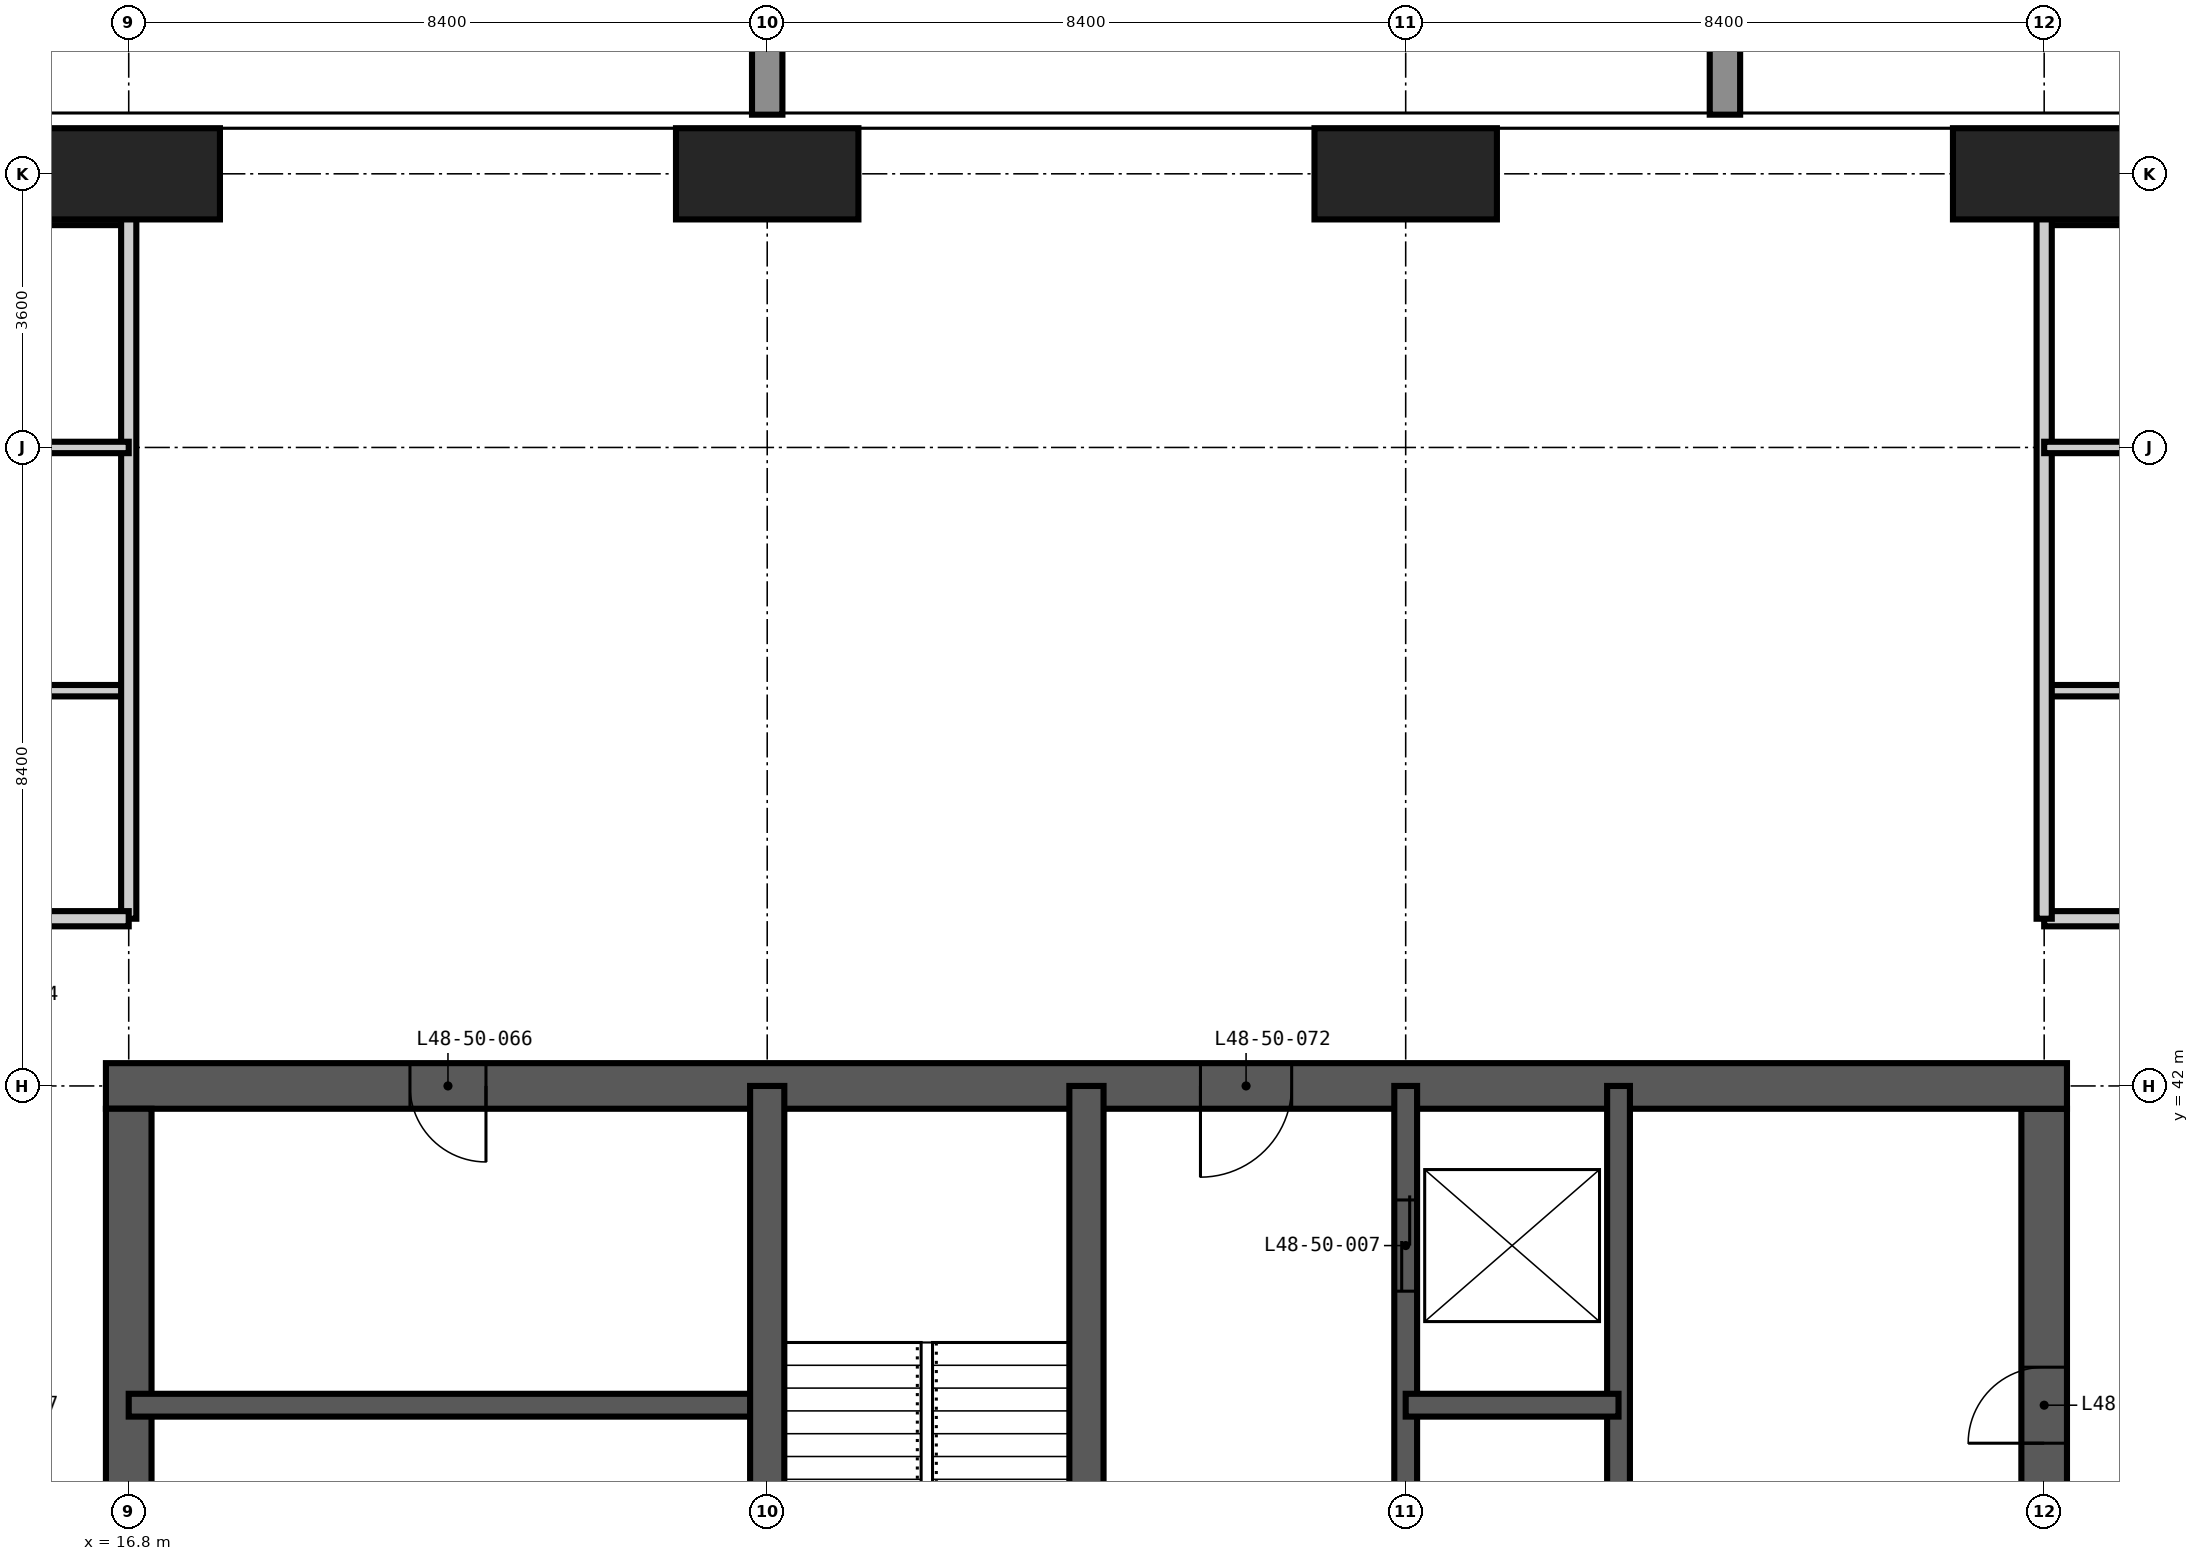
"""IFC4 building model, lengths in metres.
Left out: names, types, materials, properties, quantities, classifications, styles, units other than length and angle.
Written with IfcOpenShell. Run it as: python <this file> out.ifc"""

import sys

from ifc_helpers import new_model, si_unit, direction, frame, frame_2d, origin, origin_2d, place, context, subcontext, project, spatial, rectangle, extrude, element, fill, save


model = new_model("IFC4")
c1 = context("Model", 3, precision=1e-05, world=origin(), true_north=direction((0.0, 1.0)))
c2 = subcontext(c1, "Body", "Model", "MODEL_VIEW")
j1 = project(units=[si_unit("LENGTHUNIT", "METRE"), si_unit("PLANEANGLEUNIT", "RADIAN")], contexts=[c1])
p1 = place(None, origin())
s1 = spatial("IfcSite", under=j1, at=p1, CompositionType="ELEMENT")
p2 = place(p1, origin())
s2 = spatial("IfcBuilding", under=s1, at=p2, CompositionType="ELEMENT")
p3 = place(p2, frame((0.0, 0.0, 187.8)))
s3 = spatial("IfcBuildingStorey", under=s2, at=p3, CompositionType="ELEMENT", Elevation=187.8)
for number, where, z_axis, x_axis in (
    (1, (16.8, 54.0, -0.35), (0.0, 0.0, 1.0), (1.0, 0.0, 0.0)),
    (2, (25.2, 54.0, -0.35), (0.0, 0.0, 1.0), (1.0, 0.0, 0.0)),
    (3, (33.6, 54.0, -0.35), (0.0, 0.0, 1.0), (1.0, 0.0, 0.0)),
    (4, (42.0, 54.0, -0.35), (0.0, 0.0, 1.0), (1.0, 0.0, 0.0)),
):
    element("IfcColumn", number, at=place(p3, frame(where, z_axis=z_axis, x_axis=x_axis)), inside=s3, PredefinedType="COLUMN", context=c2, shape_type="SweptSolid", body=[
        extrude(rectangle(XDim=2.4, YDim=1.2, at=origin_2d()), origin(), (0.0, 0.0, 1.0), 3.6),
    ])
p4 = place(p3, frame((42.0, 17.1, -0.35), z_axis=(0.0, 0.0, 1.0), x_axis=(0.0, 1.0, 0.0)))
e5 = element("IfcWall", 5, at=p4, inside=s3, PredefinedType="SHEAR", context=c2, shape_type="SweptSolid", body=[
    extrude(rectangle(XDim=24.6, YDim=0.6, at=frame_2d((12.3, 0.0))), origin(), (0.0, 0.0, 1.0), 3.6),
])
p5 = place(p4, frame((0.5, 0.0, 0.35)))
e6 = element("IfcOpeningElement", 6, at=p5, cuts=e5, PredefinedType="OPENING", context=c2, shape_type="SweptSolid", body=[
    extrude(rectangle(XDim=1.2, YDim=2.2, at=frame_2d((0.6, 1.1))), frame((0.0, 0.31, 0.0), z_axis=(0.0, -1.0, 0.0), x_axis=(1.0, 0.0, 0.0)), (0.0, 0.0, 1.0), 0.62),
])
p6 = place(p4, frame((11.8, 0.0, 0.35)))
e7 = element("IfcOpeningElement", 7, at=p6, cuts=e5, PredefinedType="OPENING", context=c2, shape_type="SweptSolid", body=[
    extrude(rectangle(XDim=1.0, YDim=2.1, at=frame_2d((0.5, 1.05))), frame((0.0, 0.31, 0.0), z_axis=(0.0, -1.0, 0.0), x_axis=(1.0, 0.0, 0.0)), (0.0, 0.0, 1.0), 0.62),
])
p7 = place(p4, frame((20.2, 0.0, 0.35)))
e8 = element("IfcOpeningElement", 8, at=p7, cuts=e5, PredefinedType="OPENING", context=c2, shape_type="SweptSolid", body=[
    extrude(rectangle(XDim=1.0, YDim=2.1, at=frame_2d((0.5, 1.05))), frame((0.0, 0.31, 0.0), z_axis=(0.0, -1.0, 0.0), x_axis=(1.0, 0.0, 0.0)), (0.0, 0.0, 1.0), 0.62),
])
p8 = place(p3, frame((42.3, 42.0, -0.35), z_axis=(0.0, 0.0, 1.0), x_axis=(-1.0, 0.0, 0.0)))
e9 = element("IfcWall", 9, at=p8, inside=s3, PredefinedType="SHEAR", context=c2, shape_type="SweptSolid", body=[
    extrude(rectangle(XDim=25.8, YDim=0.6, at=frame_2d((12.9, 0.0))), origin(), (0.0, 0.0, 1.0), 3.6),
])
p9 = place(p8, frame((20.8, 0.0, 0.35)))
e10 = element("IfcOpeningElement", 10, at=p9, cuts=e9, PredefinedType="OPENING", context=c2, shape_type="SweptSolid", body=[
    extrude(rectangle(XDim=1.0, YDim=2.1, at=frame_2d((0.5, 1.05))), frame((0.0, 0.31, 0.0), z_axis=(0.0, -1.0, 0.0), x_axis=(1.0, 0.0, 0.0)), (0.0, 0.0, 1.0), 0.62),
])
p10 = place(p8, frame((10.2, 0.0, 0.35)))
e11 = element("IfcOpeningElement", 11, at=p10, cuts=e9, PredefinedType="OPENING", context=c2, shape_type="SweptSolid", body=[
    extrude(rectangle(XDim=1.2, YDim=2.2, at=frame_2d((0.6, 1.1))), frame((0.0, 0.31, 0.0), z_axis=(0.0, -1.0, 0.0), x_axis=(1.0, 0.0, 0.0)), (0.0, 0.0, 1.0), 0.62),
])
p11 = place(p3, frame((16.8, 41.7, -0.35), z_axis=(0.0, 0.0, 1.0), x_axis=(0.0, -1.0, 0.0)))
e12 = element("IfcWall", 12, at=p11, inside=s3, PredefinedType="SHEAR", context=c2, shape_type="SweptSolid", body=[
    extrude(rectangle(XDim=24.6, YDim=0.6, at=frame_2d((12.3, 0.0))), origin(), (0.0, 0.0, 1.0), 3.6),
])
p12 = place(p11, frame((11.4, 0.0, 0.35)))
e13 = element("IfcOpeningElement", 13, at=p12, cuts=e12, PredefinedType="OPENING", context=c2, shape_type="SweptSolid", body=[
    extrude(rectangle(XDim=1.8, YDim=2.2, at=frame_2d((0.9, 1.1))), frame((0.0, 0.31, 0.0), z_axis=(0.0, -1.0, 0.0), x_axis=(1.0, 0.0, 0.0)), (0.0, 0.0, 1.0), 0.62),
])
p13 = place(p11, frame((20.2, 0.0, 0.35)))
e14 = element("IfcOpeningElement", 14, at=p13, cuts=e12, PredefinedType="OPENING", context=c2, shape_type="SweptSolid", body=[
    extrude(rectangle(XDim=1.0, YDim=2.1, at=frame_2d((0.5, 1.05))), frame((0.0, 0.31, 0.0), z_axis=(0.0, -1.0, 0.0), x_axis=(1.0, 0.0, 0.0)), (0.0, 0.0, 1.0), 0.62),
])
p14 = place(p11, frame((5.5, 0.0, 0.35)))
e15 = element("IfcOpeningElement", 15, at=p14, cuts=e12, PredefinedType="OPENING", context=c2, shape_type="SweptSolid", body=[
    extrude(rectangle(XDim=1.0, YDim=2.1, at=frame_2d((0.5, 1.05))), frame((0.0, 0.31, 0.0), z_axis=(0.0, -1.0, 0.0), x_axis=(1.0, 0.0, 0.0)), (0.0, 0.0, 1.0), 0.62),
])
p15 = place(p3, frame((33.6, 16.8, -0.35), z_axis=(0.0, 0.0, 1.0), x_axis=(0.0, 1.0, 0.0)))
e16 = element("IfcWall", 16, at=p15, inside=s3, PredefinedType="SHEAR", context=c2, shape_type="SweptSolid", body=[
    extrude(rectangle(XDim=25.2, YDim=0.3, at=frame_2d((12.6, 0.0))), origin(), (0.0, 0.0, 1.0), 3.6),
])
p16 = place(p15, frame((22.5, 0.0, 0.35)))
e17 = element("IfcOpeningElement", 17, at=p16, cuts=e16, PredefinedType="OPENING", context=c2, shape_type="SweptSolid", body=[
    extrude(rectangle(XDim=1.2, YDim=2.2, at=frame_2d((0.6, 1.1))), frame((0.0, 0.16, 0.0), z_axis=(0.0, -1.0, 0.0), x_axis=(1.0, 0.0, 0.0)), (0.0, 0.0, 1.0), 0.32),
])
p17 = place(p15, frame((18.3, 0.0, 0.35)))
e18 = element("IfcOpeningElement", 18, at=p17, cuts=e16, PredefinedType="OPENING", context=c2, shape_type="SweptSolid", body=[
    extrude(rectangle(XDim=1.2, YDim=2.2, at=frame_2d((0.6, 1.1))), frame((0.0, 0.16, 0.0), z_axis=(0.0, -1.0, 0.0), x_axis=(1.0, 0.0, 0.0)), (0.0, 0.0, 1.0), 0.32),
])
p18 = place(p15, frame((12.1, 0.0, 0.35)))
e19 = element("IfcOpeningElement", 19, at=p18, cuts=e16, PredefinedType="OPENING", context=c2, shape_type="SweptSolid", body=[
    extrude(rectangle(XDim=1.0, YDim=2.1, at=frame_2d((0.5, 1.05))), frame((0.0, 0.16, 0.0), z_axis=(0.0, -1.0, 0.0), x_axis=(1.0, 0.0, 0.0)), (0.0, 0.0, 1.0), 0.32),
])
for number, where, z_axis, x_axis in (
    (20, (36.4, 33.6, -0.35), (0.0, 0.0, 1.0), (0.0, 1.0, 0.0)),
    (21, (16.8, 37.8, -0.35), (0.0, 0.0, 1.0), (1.0, 0.0, 0.0)),
):
    element("IfcWall", number, at=place(p3, frame(where, z_axis=z_axis, x_axis=x_axis)), inside=s3, PredefinedType="SHEAR", context=c2, shape_type="SweptSolid", body=[
        extrude(rectangle(XDim=8.4, YDim=0.3, at=frame_2d((4.2, 0.0))), origin(), (0.0, 0.0, 1.0), 3.6),
    ])
p19 = place(p3, frame((33.6, 37.8, -0.35), z_axis=(0.0, 0.0, 1.0), x_axis=(1.0, 0.0, 0.0)))
e22 = element("IfcWall", 22, at=p19, inside=s3, PredefinedType="SHEAR", context=c2, shape_type="SweptSolid", body=[
    extrude(rectangle(XDim=2.8, YDim=0.3, at=frame_2d((1.4, 0.0))), origin(), (0.0, 0.0, 1.0), 3.6),
])
p20 = place(p3, frame((25.2, 16.8, -0.35), z_axis=(0.0, 0.0, 1.0), x_axis=(0.0, 1.0, 0.0)))
e23 = element("IfcWall", 23, at=p20, inside=s3, PredefinedType="SHEAR", context=c2, shape_type="SweptSolid", body=[
    extrude(rectangle(XDim=25.2, YDim=0.45, at=frame_2d((12.6, 0.0))), origin(), (0.0, 0.0, 1.0), 3.6),
])
p21 = place(p3, frame((29.4, 33.6, -0.35), z_axis=(0.0, 0.0, 1.0), x_axis=(0.0, 1.0, 0.0)))
e24 = element("IfcWall", 24, at=p21, inside=s3, PredefinedType="SHEAR", context=c2, shape_type="SweptSolid", body=[
    extrude(rectangle(XDim=8.4, YDim=0.45, at=frame_2d((4.2, 0.0))), origin(), (0.0, 0.0, 1.0), 3.6),
])
p22 = place(p21, frame((0.525, 0.0, 0.35)))
e25 = element("IfcOpeningElement", 25, at=p22, cuts=e24, PredefinedType="OPENING", context=c2, shape_type="SweptSolid", body=[
    extrude(rectangle(XDim=1.2, YDim=2.2, at=frame_2d((0.6, 1.1))), frame((0.0, 0.235, 0.0), z_axis=(0.0, -1.0, 0.0), x_axis=(1.0, 0.0, 0.0)), (0.0, 0.0, 1.0), 0.47),
])
p23 = place(p3, frame((14.0, 47.2, 0.0), z_axis=(0.0, 0.0, 1.0), x_axis=(1.0, 0.0, 0.0)))
e26 = element("IfcWall", 26, at=p23, inside=s3, PredefinedType="PARTITIONING", context=c2, shape_type="SweptSolid", body=[
    extrude(rectangle(XDim=2.8, YDim=0.15, at=frame_2d((1.4, 0.0))), origin(), (0.0, 0.0, 1.0), 3.25),
])
p24 = place(p3, frame((42.0, 47.2, 0.0), z_axis=(0.0, 0.0, 1.0), x_axis=(1.0, 0.0, 0.0)))
e27 = element("IfcWall", 27, at=p24, inside=s3, PredefinedType="PARTITIONING", context=c2, shape_type="SweptSolid", body=[
    extrude(rectangle(XDim=3.4, YDim=0.15, at=frame_2d((1.7, 0.0))), origin(), (0.0, 0.0, 1.0), 3.25),
])
p25 = place(p24, frame((1.275, 0.0, 0.0)))
e28 = element("IfcOpeningElement", 28, at=p25, cuts=e27, PredefinedType="OPENING", context=c2, shape_type="SweptSolid", body=[
    extrude(rectangle(XDim=0.85, YDim=2.1, at=frame_2d((0.425, 1.05))), frame((0.0, 0.085, 0.0), z_axis=(0.0, -1.0, 0.0), x_axis=(1.0, 0.0, 0.0)), (0.0, 0.0, 1.0), 0.17),
])
p26 = place(p3, frame((13.2, 53.4, 0.0), z_axis=(0.0, 0.0, 1.0), x_axis=(1.0, 0.0, 0.0)))
e29 = element("IfcWall", 29, at=p26, inside=s3, PredefinedType="PARTITIONING", context=c2, shape_type="SweptSolid", body=[
    extrude(rectangle(XDim=3.6, YDim=0.15, at=frame_2d((1.8, 0.0))), origin(), (0.0, 0.0, 1.0), 3.25),
])
p27 = place(p26, frame((1.375, 0.0, 0.0)))
e30 = element("IfcOpeningElement", 30, at=p27, cuts=e29, PredefinedType="OPENING", context=c2, shape_type="SweptSolid", body=[
    extrude(rectangle(XDim=0.85, YDim=2.1, at=frame_2d((0.425, 1.05))), frame((0.0, 0.085, 0.0), z_axis=(0.0, -1.0, 0.0), x_axis=(1.0, 0.0, 0.0)), (0.0, 0.0, 1.0), 0.17),
])
p28 = place(p3, frame((42.0, 53.4, 0.0), z_axis=(0.0, 0.0, 1.0), x_axis=(1.0, 0.0, 0.0)))
e31 = element("IfcWall", 31, at=p28, inside=s3, PredefinedType="PARTITIONING", context=c2, shape_type="SweptSolid", body=[
    extrude(rectangle(XDim=3.6, YDim=0.15, at=frame_2d((1.8, 0.0))), origin(), (0.0, 0.0, 1.0), 3.25),
])
p29 = place(p28, frame((1.375, 0.0, 0.0)))
e32 = element("IfcOpeningElement", 32, at=p29, cuts=e31, PredefinedType="OPENING", context=c2, shape_type="SweptSolid", body=[
    extrude(rectangle(XDim=0.85, YDim=2.1, at=frame_2d((0.425, 1.05))), frame((0.0, 0.085, 0.0), z_axis=(0.0, -1.0, 0.0), x_axis=(1.0, 0.0, 0.0)), (0.0, 0.0, 1.0), 0.17),
])
p30 = place(p3, frame((16.8, 44.2, 0.0), z_axis=(0.0, 0.0, 1.0), x_axis=(0.0, 1.0, 0.0)))
e33 = element("IfcWall", 33, at=p30, inside=s3, PredefinedType="PARTITIONING", context=c2, shape_type="SweptSolid", body=[
    extrude(rectangle(XDim=10.418, YDim=0.2, at=frame_2d((5.209, 0.0))), origin(), (0.0, 0.0, 1.0), 3.25),
])
p31 = place(p3, frame((14.0, 44.2, 0.0), z_axis=(0.0, 0.0, 1.0), x_axis=(1.0, 0.0, 0.0)))
e34 = element("IfcWall", 34, at=p31, inside=s3, PredefinedType="PARTITIONING", context=c2, shape_type="SweptSolid", body=[
    extrude(rectangle(XDim=2.8, YDim=0.2, at=frame_2d((1.4, 0.0))), origin(), (0.0, 0.0, 1.0), 3.25),
])
p32 = place(p3, frame((42.0, 44.2, 0.0), z_axis=(0.0, 0.0, 1.0), x_axis=(1.0, 0.0, 0.0)))
e35 = element("IfcWall", 35, at=p32, inside=s3, PredefinedType="PARTITIONING", context=c2, shape_type="SweptSolid", body=[
    extrude(rectangle(XDim=3.4, YDim=0.2, at=frame_2d((1.7, 0.0))), origin(), (0.0, 0.0, 1.0), 3.25),
])
p33 = place(p3, frame((42.0, 54.618, 0.0), z_axis=(0.0, 0.0, 1.0), x_axis=(0.0, -1.0, 0.0)))
e36 = element("IfcWall", 36, at=p33, inside=s3, PredefinedType="PARTITIONING", context=c2, shape_type="SweptSolid", body=[
    extrude(rectangle(XDim=10.418, YDim=0.2, at=frame_2d((5.209, 0.0))), origin(), (0.0, 0.0, 1.0), 3.25),
])
p34 = place(p3, frame((4.182, 50.4, 0.0), z_axis=(0.0, 0.0, 1.0), x_axis=(1.0, 0.0, 0.0)))
e37 = element("IfcWall", 37, at=p34, inside=s3, PredefinedType="PARTITIONING", context=c2, shape_type="SweptSolid", body=[
    extrude(rectangle(XDim=12.618, YDim=0.15, at=frame_2d((6.309, 0.0))), origin(), (0.0, 0.0, 1.0), 3.25),
])
p35 = place(p34, frame((2.868, 0.0, 0.0)))
e38 = element("IfcOpeningElement", 38, at=p35, cuts=e37, PredefinedType="OPENING", context=c2, shape_type="SweptSolid", body=[
    extrude(rectangle(XDim=0.9, YDim=2.1, at=frame_2d((0.45, 1.05))), frame((0.0, 0.085, 0.0), z_axis=(0.0, -1.0, 0.0), x_axis=(1.0, 0.0, 0.0)), (0.0, 0.0, 1.0), 0.17),
])
p36 = place(p3, frame((42.0, 50.4, 0.0), z_axis=(0.0, 0.0, 1.0), x_axis=(1.0, 0.0, 0.0)))
e39 = element("IfcWall", 39, at=p36, inside=s3, PredefinedType="PARTITIONING", context=c2, shape_type="SweptSolid", body=[
    extrude(rectangle(XDim=12.618, YDim=0.15, at=frame_2d((6.309, 0.0))), origin(), (0.0, 0.0, 1.0), 3.25),
])
p37 = place(p36, frame((8.85, 0.0, 0.0)))
e40 = element("IfcOpeningElement", 40, at=p37, cuts=e39, PredefinedType="OPENING", context=c2, shape_type="SweptSolid", body=[
    extrude(rectangle(XDim=0.9, YDim=2.1, at=frame_2d((0.45, 1.05))), frame((0.0, 0.085, 0.0), z_axis=(0.0, -1.0, 0.0), x_axis=(1.0, 0.0, 0.0)), (0.0, 0.0, 1.0), 0.17),
])
p38 = place(p16, origin())
e41 = element("IfcDoor", 41, at=p38, inside=s3, OperationType="DOUBLE_DOOR_SLIDING", PredefinedType="DOOR", context=c2, shape_type="SweptSolid", body=[
    extrude(rectangle(XDim=1.2, YDim=2.2, at=frame_2d((0.6, 1.1))), frame((0.0, 0.025, 0.0), z_axis=(0.0, -1.0, 0.0), x_axis=(1.0, 0.0, 0.0)), (0.0, 0.0, 1.0), 0.05),
])
fill(e17, e41)
p39 = place(p9, origin())
e42 = element("IfcDoor", 42, at=p39, inside=s3, OperationType="SINGLE_SWING_LEFT", PredefinedType="DOOR", context=c2, shape_type="SweptSolid", body=[
    extrude(rectangle(XDim=1.0, YDim=2.1, at=frame_2d((0.5, 1.05))), frame((0.0, 0.025, 0.0), z_axis=(0.0, -1.0, 0.0), x_axis=(1.0, 0.0, 0.0)), (0.0, 0.0, 1.0), 0.05),
])
fill(e10, e42)
p40 = place(p10, origin())
e43 = element("IfcDoor", 43, at=p40, inside=s3, OperationType="SINGLE_SWING_RIGHT", PredefinedType="DOOR", context=c2, shape_type="SweptSolid", body=[
    extrude(rectangle(XDim=1.2, YDim=2.2, at=frame_2d((0.6, 1.1))), frame((0.0, 0.025, 0.0), z_axis=(0.0, -1.0, 0.0), x_axis=(1.0, 0.0, 0.0)), (0.0, 0.0, 1.0), 0.05),
])
fill(e11, e43)
p41 = place(p7, origin())
e44 = element("IfcDoor", 44, at=p41, inside=s3, OperationType="SINGLE_SWING_LEFT", PredefinedType="DOOR", context=c2, shape_type="SweptSolid", body=[
    extrude(rectangle(XDim=1.0, YDim=2.1, at=frame_2d((0.5, 1.05))), frame((0.0, 0.025, 0.0), z_axis=(0.0, -1.0, 0.0), x_axis=(1.0, 0.0, 0.0)), (0.0, 0.0, 1.0), 0.05),
])
fill(e8, e44)
save(model, sys.argv[1])
